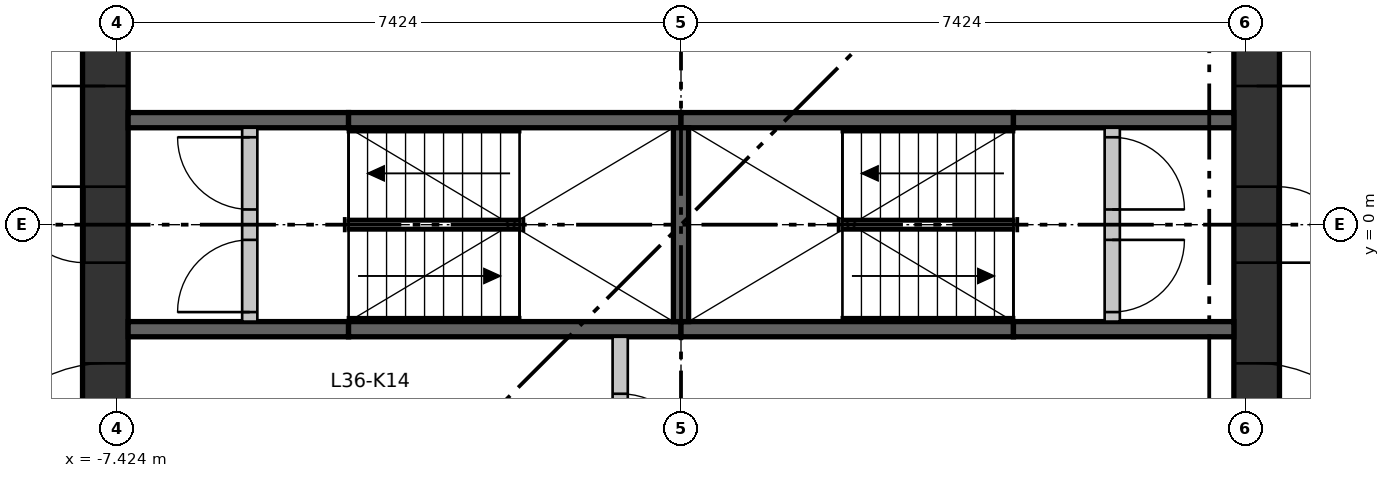
"""IFC4 building model, lengths in metres.
Left out: names, types, materials, properties, quantities, classifications, styles, units other than length and angle.
Written with IfcOpenShell. Run it as: python <this file> out.ifc"""

import sys

from ifc_helpers import new_model, si_unit, direction, frame, frame_2d, origin, place, context, subcontext, project, spatial, rectangle, extrude, element, fill, save


model = new_model("IFC4")
c1 = context("Model", 3, precision=1e-05, world=origin(), true_north=direction((0.0, 1.0)))
c2 = subcontext(c1, "Body", "Model", "MODEL_VIEW")
j1 = project(units=[si_unit("LENGTHUNIT", "METRE"), si_unit("PLANEANGLEUNIT", "RADIAN")], contexts=[c1])
p1 = place(None, origin())
s1 = spatial("IfcSite", under=j1, at=p1, CompositionType="ELEMENT")
p2 = place(p1, origin())
s2 = spatial("IfcBuilding", under=s1, at=p2, CompositionType="ELEMENT")
p3 = place(p2, frame((0.0, 0.0, 137.7)))
s3 = spatial("IfcBuildingStorey", under=s2, at=p3, CompositionType="ELEMENT", Elevation=137.7)
p4 = place(p3, frame((-7.574, -7.274, 0.0), z_axis=(0.0, 0.0, 1.0), x_axis=(0.0, 1.0, 0.0)))
e1 = element("IfcWall", 1, at=p4, inside=s3, PredefinedType="SHEAR", context=c2, shape_type="SweptSolid", body=[
    extrude(rectangle(XDim=14.548, YDim=0.6, at=frame_2d((7.274, 0.0))), origin(), (0.0, 0.0, 1.0), 3.35),
])
p5 = place(p4, frame((6.774, 0.0, 0.0)))
e2 = element("IfcOpeningElement", 2, at=p5, cuts=e1, PredefinedType="OPENING", context=c2, shape_type="SweptSolid", body=[
    extrude(rectangle(XDim=1.0, YDim=2.1, at=frame_2d((0.5, 1.05))), frame((0.0, 0.31, 0.0), z_axis=(0.0, -1.0, 0.0), x_axis=(1.0, 0.0, 0.0)), (0.0, 0.0, 1.0), 0.62),
])
p6 = place(p4, frame((3.649, 0.0, 0.0)))
e3 = element("IfcOpeningElement", 3, at=p6, cuts=e1, PredefinedType="OPENING", context=c2, shape_type="SweptSolid", body=[
    extrude(rectangle(XDim=1.8, YDim=2.1, at=frame_2d((0.9, 1.05))), frame((0.0, 0.31, 0.0), z_axis=(0.0, -1.0, 0.0), x_axis=(1.0, 0.0, 0.0)), (0.0, 0.0, 1.0), 0.62),
])
p7 = place(p4, frame((9.098, 0.0, 0.0)))
e4 = element("IfcOpeningElement", 4, at=p7, cuts=e1, PredefinedType="OPENING", context=c2, shape_type="SweptSolid", body=[
    extrude(rectangle(XDim=1.8, YDim=2.1, at=frame_2d((0.9, 1.05))), frame((0.0, 0.31, 0.0), z_axis=(0.0, -1.0, 0.0), x_axis=(1.0, 0.0, 0.0)), (0.0, 0.0, 1.0), 0.62),
])
p8 = place(p3, frame((7.574, -7.274, 0.0), z_axis=(0.0, 0.0, 1.0), x_axis=(0.0, 1.0, 0.0)))
e5 = element("IfcWall", 5, at=p8, inside=s3, PredefinedType="SHEAR", context=c2, shape_type="SweptSolid", body=[
    extrude(rectangle(XDim=14.548, YDim=0.6, at=frame_2d((7.274, 0.0))), origin(), (0.0, 0.0, 1.0), 3.35),
])
p9 = place(p8, frame((6.774, 0.0, 0.0)))
e6 = element("IfcOpeningElement", 6, at=p9, cuts=e5, PredefinedType="OPENING", context=c2, shape_type="SweptSolid", body=[
    extrude(rectangle(XDim=1.0, YDim=2.1, at=frame_2d((0.5, 1.05))), frame((0.0, 0.31, 0.0), z_axis=(0.0, -1.0, 0.0), x_axis=(1.0, 0.0, 0.0)), (0.0, 0.0, 1.0), 0.62),
])
p10 = place(p8, frame((3.649, 0.0, 0.0)))
e7 = element("IfcOpeningElement", 7, at=p10, cuts=e5, PredefinedType="OPENING", context=c2, shape_type="SweptSolid", body=[
    extrude(rectangle(XDim=1.8, YDim=2.1, at=frame_2d((0.9, 1.05))), frame((0.0, 0.31, 0.0), z_axis=(0.0, -1.0, 0.0), x_axis=(1.0, 0.0, 0.0)), (0.0, 0.0, 1.0), 0.62),
])
p11 = place(p8, frame((9.098, 0.0, 0.0)))
e8 = element("IfcOpeningElement", 8, at=p11, cuts=e5, PredefinedType="OPENING", context=c2, shape_type="SweptSolid", body=[
    extrude(rectangle(XDim=1.8, YDim=2.1, at=frame_2d((0.9, 1.05))), frame((0.0, 0.31, 0.0), z_axis=(0.0, -1.0, 0.0), x_axis=(1.0, 0.0, 0.0)), (0.0, 0.0, 1.0), 0.62),
])
p12 = place(p3, frame((-7.274, -1.375, 0.0), z_axis=(0.0, 0.0, 1.0), x_axis=(1.0, 0.0, 0.0)))
e9 = element("IfcWall", 9, at=p12, inside=s3, PredefinedType="SHEAR", context=c2, shape_type="SweptSolid", body=[
    extrude(rectangle(XDim=2.9, YDim=0.2, at=frame_2d((1.45, 0.0))), origin(), (0.0, 0.0, 1.0), 3.0),
])
for number, where, z_axis, x_axis in (
    (10, (-4.374, -1.375, 0.0), (0.0, 0.0, 1.0), (1.0, 0.0, 0.0)),
    (11, (0.0, -1.375, 0.0), (0.0, 0.0, 1.0), (1.0, 0.0, 0.0)),
):
    element("IfcWall", number, at=place(p3, frame(where, z_axis=z_axis, x_axis=x_axis)), inside=s3, PredefinedType="SHEAR", context=c2, shape_type="SweptSolid", body=[
        extrude(rectangle(XDim=4.374, YDim=0.2, at=frame_2d((2.187, 0.0))), origin(), (0.0, 0.0, 1.0), 3.0),
    ])
for number, where, z_axis, x_axis in (
    (12, (4.374, -1.375, 0.0), (0.0, 0.0, 1.0), (1.0, 0.0, 0.0)),
    (13, (-7.274, 1.375, 0.0), (0.0, 0.0, 1.0), (1.0, 0.0, 0.0)),
):
    element("IfcWall", number, at=place(p3, frame(where, z_axis=z_axis, x_axis=x_axis)), inside=s3, PredefinedType="SHEAR", context=c2, shape_type="SweptSolid", body=[
        extrude(rectangle(XDim=2.9, YDim=0.2, at=frame_2d((1.45, 0.0))), origin(), (0.0, 0.0, 1.0), 3.0),
    ])
for number, where, z_axis, x_axis in (
    (14, (-4.374, 1.375, 0.0), (0.0, 0.0, 1.0), (1.0, 0.0, 0.0)),
    (15, (0.0, 1.375, 0.0), (0.0, 0.0, 1.0), (1.0, 0.0, 0.0)),
):
    element("IfcWall", number, at=place(p3, frame(where, z_axis=z_axis, x_axis=x_axis)), inside=s3, PredefinedType="SHEAR", context=c2, shape_type="SweptSolid", body=[
        extrude(rectangle(XDim=4.374, YDim=0.2, at=frame_2d((2.187, 0.0))), origin(), (0.0, 0.0, 1.0), 3.0),
    ])
p13 = place(p3, frame((4.374, 1.375, 0.0), z_axis=(0.0, 0.0, 1.0), x_axis=(1.0, 0.0, 0.0)))
e16 = element("IfcWall", 16, at=p13, inside=s3, PredefinedType="SHEAR", context=c2, shape_type="SweptSolid", body=[
    extrude(rectangle(XDim=2.9, YDim=0.2, at=frame_2d((1.45, 0.0))), origin(), (0.0, 0.0, 1.0), 3.0),
])
p14 = place(p3, frame((0.0, -1.275, 0.0), z_axis=(0.0, 0.0, 1.0), x_axis=(0.0, 1.0, 0.0)))
e17 = element("IfcWall", 17, at=p14, inside=s3, PredefinedType="SHEAR", context=c2, shape_type="SweptSolid", body=[
    extrude(rectangle(XDim=2.55, YDim=0.2, at=frame_2d((1.275, 0.0))), origin(), (0.0, 0.0, 1.0), 3.0),
])
p15 = place(p3, frame((-0.8, -3.974, 0.0), z_axis=(0.0, 0.0, 1.0), x_axis=(0.0, 1.0, 0.0)))
e18 = element("IfcWall", 18, at=p15, inside=s3, PredefinedType="PARTITIONING", context=c2, shape_type="SweptSolid", body=[
    extrude(rectangle(XDim=2.499, YDim=0.2, at=frame_2d((1.25, 0.0))), origin(), (0.0, 0.0, 1.0), 3.0),
])
p16 = place(p15, frame((0.75, 0.0, 0.0)))
e19 = element("IfcOpeningElement", 19, at=p16, cuts=e18, PredefinedType="OPENING", context=c2, shape_type="SweptSolid", body=[
    extrude(rectangle(XDim=1.0, YDim=2.1, at=frame_2d((0.5, 1.05))), frame((0.0, 0.11, 0.0), z_axis=(0.0, -1.0, 0.0), x_axis=(1.0, 0.0, 0.0)), (0.0, 0.0, 1.0), 0.22),
])
p17 = place(p3, frame((-5.674, -1.275, 0.0), z_axis=(0.0, 0.0, 1.0), x_axis=(0.0, 1.0, 0.0)))
e20 = element("IfcWall", 20, at=p17, inside=s3, PredefinedType="PARTITIONING", context=c2, shape_type="SweptSolid", body=[
    extrude(rectangle(XDim=2.55, YDim=0.2, at=frame_2d((1.275, 0.0))), origin(), (0.0, 0.0, 1.0), 3.0),
])
p18 = place(p17, frame((0.125, 0.0, 0.0)))
e21 = element("IfcOpeningElement", 21, at=p18, cuts=e20, PredefinedType="OPENING", context=c2, shape_type="SweptSolid", body=[
    extrude(rectangle(XDim=0.95, YDim=2.1, at=frame_2d((0.475, 1.05))), frame((0.0, 0.11, 0.0), z_axis=(0.0, -1.0, 0.0), x_axis=(1.0, 0.0, 0.0)), (0.0, 0.0, 1.0), 0.22),
])
p19 = place(p17, frame((1.475, 0.0, 0.0)))
e22 = element("IfcOpeningElement", 22, at=p19, cuts=e20, PredefinedType="OPENING", context=c2, shape_type="SweptSolid", body=[
    extrude(rectangle(XDim=0.95, YDim=2.1, at=frame_2d((0.475, 1.05))), frame((0.0, 0.11, 0.0), z_axis=(0.0, -1.0, 0.0), x_axis=(1.0, 0.0, 0.0)), (0.0, 0.0, 1.0), 0.22),
])
p20 = place(p3, frame((5.674, -1.275, 0.0), z_axis=(0.0, 0.0, 1.0), x_axis=(0.0, 1.0, 0.0)))
e23 = element("IfcWall", 23, at=p20, inside=s3, PredefinedType="PARTITIONING", context=c2, shape_type="SweptSolid", body=[
    extrude(rectangle(XDim=2.55, YDim=0.2, at=frame_2d((1.275, 0.0))), origin(), (0.0, 0.0, 1.0), 3.0),
])
p21 = place(p20, frame((0.125, 0.0, 0.0)))
e24 = element("IfcOpeningElement", 24, at=p21, cuts=e23, PredefinedType="OPENING", context=c2, shape_type="SweptSolid", body=[
    extrude(rectangle(XDim=0.95, YDim=2.1, at=frame_2d((0.475, 1.05))), frame((0.0, 0.11, 0.0), z_axis=(0.0, -1.0, 0.0), x_axis=(1.0, 0.0, 0.0)), (0.0, 0.0, 1.0), 0.22),
])
p22 = place(p20, frame((1.475, 0.0, 0.0)))
e25 = element("IfcOpeningElement", 25, at=p22, cuts=e23, PredefinedType="OPENING", context=c2, shape_type="SweptSolid", body=[
    extrude(rectangle(XDim=0.95, YDim=2.1, at=frame_2d((0.475, 1.05))), frame((0.0, 0.11, 0.0), z_axis=(0.0, -1.0, 0.0), x_axis=(1.0, 0.0, 0.0)), (0.0, 0.0, 1.0), 0.22),
])
p23 = place(p18, origin())
e26 = element("IfcDoor", 26, at=p23, inside=s3, OperationType="SINGLE_SWING_LEFT", PredefinedType="DOOR", context=c2, shape_type="SweptSolid", body=[
    extrude(rectangle(XDim=0.95, YDim=2.1, at=frame_2d((0.475, 1.05))), frame((0.0, 0.025, 0.0), z_axis=(0.0, -1.0, 0.0), x_axis=(1.0, 0.0, 0.0)), (0.0, 0.0, 1.0), 0.05),
])
fill(e21, e26)
p24 = place(p19, origin())
e27 = element("IfcDoor", 27, at=p24, inside=s3, OperationType="SINGLE_SWING_RIGHT", PredefinedType="DOOR", context=c2, shape_type="SweptSolid", body=[
    extrude(rectangle(XDim=0.95, YDim=2.1, at=frame_2d((0.475, 1.05))), frame((0.0, 0.025, 0.0), z_axis=(0.0, -1.0, 0.0), x_axis=(1.0, 0.0, 0.0)), (0.0, 0.0, 1.0), 0.05),
])
fill(e22, e27)
p25 = place(p21, frame((0.95, 0.0, 0.0), z_axis=(0.0, 0.0, 1.0), x_axis=(-1.0, 0.0, 0.0)))
e28 = element("IfcDoor", 28, at=p25, inside=s3, OperationType="SINGLE_SWING_RIGHT", PredefinedType="DOOR", context=c2, shape_type="SweptSolid", body=[
    extrude(rectangle(XDim=0.95, YDim=2.1, at=frame_2d((0.475, 1.05))), frame((0.0, 0.025, 0.0), z_axis=(0.0, -1.0, 0.0), x_axis=(1.0, 0.0, 0.0)), (0.0, 0.0, 1.0), 0.05),
])
fill(e24, e28)
p26 = place(p22, frame((0.95, 0.0, 0.0), z_axis=(0.0, 0.0, 1.0), x_axis=(-1.0, 0.0, 0.0)))
e29 = element("IfcDoor", 29, at=p26, inside=s3, OperationType="SINGLE_SWING_LEFT", PredefinedType="DOOR", context=c2, shape_type="SweptSolid", body=[
    extrude(rectangle(XDim=0.95, YDim=2.1, at=frame_2d((0.475, 1.05))), frame((0.0, 0.025, 0.0), z_axis=(0.0, -1.0, 0.0), x_axis=(1.0, 0.0, 0.0)), (0.0, 0.0, 1.0), 0.05),
])
fill(e25, e29)
p27 = place(p16, frame((1.0, 0.0, 0.0), z_axis=(0.0, 0.0, 1.0), x_axis=(-1.0, 0.0, 0.0)))
e30 = element("IfcDoor", 30, at=p27, inside=s3, OperationType="SINGLE_SWING_LEFT", PredefinedType="DOOR", context=c2, shape_type="SweptSolid", body=[
    extrude(rectangle(XDim=1.0, YDim=2.1, at=frame_2d((0.5, 1.05))), frame((0.0, 0.025, 0.0), z_axis=(0.0, -1.0, 0.0), x_axis=(1.0, 0.0, 0.0)), (0.0, 0.0, 1.0), 0.05),
])
fill(e19, e30)
p28 = place(p5, origin())
e31 = element("IfcDoor", 31, at=p28, inside=s3, OperationType="SINGLE_SWING_RIGHT", PredefinedType="DOOR", context=c2, shape_type="SweptSolid", body=[
    extrude(rectangle(XDim=1.0, YDim=2.1, at=frame_2d((0.5, 1.05))), frame((0.0, 0.3, 0.0), z_axis=(0.0, -1.0, 0.0), x_axis=(1.0, 0.0, 0.0)), (0.0, 0.0, 1.0), 0.05),
])
fill(e2, e31)
p29 = place(p6, origin())
e32 = element("IfcDoor", 32, at=p29, inside=s3, OperationType="DOUBLE_DOOR_SINGLE_SWING", PredefinedType="DOOR", context=c2, shape_type="SweptSolid", body=[
    extrude(rectangle(XDim=1.8, YDim=2.1, at=frame_2d((0.9, 1.05))), frame((0.0, 0.025, 0.0), z_axis=(0.0, -1.0, 0.0), x_axis=(1.0, 0.0, 0.0)), (0.0, 0.0, 1.0), 0.05),
])
fill(e3, e32)
p30 = place(p7, origin())
e33 = element("IfcDoor", 33, at=p30, inside=s3, OperationType="DOUBLE_DOOR_SINGLE_SWING", PredefinedType="DOOR", context=c2, shape_type="SweptSolid", body=[
    extrude(rectangle(XDim=1.8, YDim=2.1, at=frame_2d((0.9, 1.05))), frame((0.0, 0.025, 0.0), z_axis=(0.0, -1.0, 0.0), x_axis=(1.0, 0.0, 0.0)), (0.0, 0.0, 1.0), 0.05),
])
fill(e4, e33)
p31 = place(p9, frame((1.0, 0.0, 0.0), z_axis=(0.0, 0.0, 1.0), x_axis=(-1.0, 0.0, 0.0)))
e34 = element("IfcDoor", 34, at=p31, inside=s3, OperationType="SINGLE_SWING_LEFT", PredefinedType="DOOR", context=c2, shape_type="SweptSolid", body=[
    extrude(rectangle(XDim=1.0, YDim=2.1, at=frame_2d((0.5, 1.05))), frame((0.0, 0.3, 0.0), z_axis=(0.0, -1.0, 0.0), x_axis=(1.0, 0.0, 0.0)), (0.0, 0.0, 1.0), 0.05),
])
fill(e6, e34)
p32 = place(p10, frame((1.8, 0.0, 0.0), z_axis=(0.0, 0.0, 1.0), x_axis=(-1.0, 0.0, 0.0)))
e35 = element("IfcDoor", 35, at=p32, inside=s3, OperationType="DOUBLE_DOOR_SINGLE_SWING", PredefinedType="DOOR", context=c2, shape_type="SweptSolid", body=[
    extrude(rectangle(XDim=1.8, YDim=2.1, at=frame_2d((0.9, 1.05))), frame((0.0, 0.025, 0.0), z_axis=(0.0, -1.0, 0.0), x_axis=(1.0, 0.0, 0.0)), (0.0, 0.0, 1.0), 0.05),
])
fill(e7, e35)
p33 = place(p11, frame((1.8, 0.0, 0.0), z_axis=(0.0, 0.0, 1.0), x_axis=(-1.0, 0.0, 0.0)))
e36 = element("IfcDoor", 36, at=p33, inside=s3, OperationType="DOUBLE_DOOR_SINGLE_SWING", PredefinedType="DOOR", context=c2, shape_type="SweptSolid", body=[
    extrude(rectangle(XDim=1.8, YDim=2.1, at=frame_2d((0.9, 1.05))), frame((0.0, 0.025, 0.0), z_axis=(0.0, -1.0, 0.0), x_axis=(1.0, 0.0, 0.0)), (0.0, 0.0, 1.0), 0.05),
])
fill(e8, e36)
save(model, sys.argv[1])
